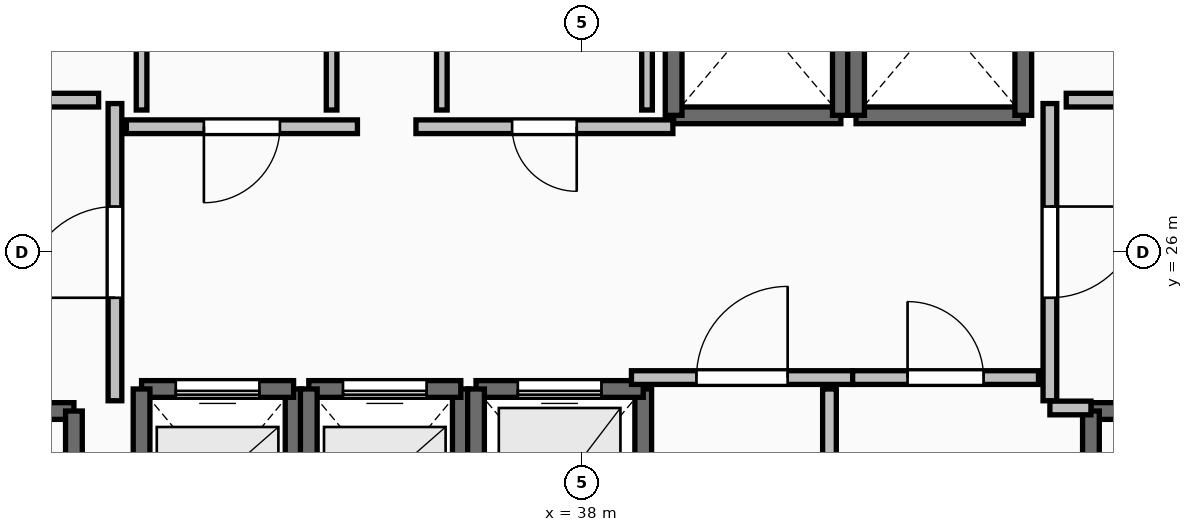
"""IFC4 building model, lengths in metres.
Left out: names, types, materials, properties, quantities, classifications, styles, units other than length and angle.
Written with IfcOpenShell. Run it as: python <this file> out.ifc"""

import sys

from ifc_helpers import new_model, si_unit, direction, frame, frame_2d, origin, place, context, subcontext, project, spatial, rectangle, extrude, element, fill, save


model = new_model("IFC4")
c1 = context("Model", 3, precision=1e-05, world=origin(), true_north=direction((0.0, 1.0)))
c2 = subcontext(c1, "Body", "Model", "MODEL_VIEW")
j1 = project(units=[si_unit("LENGTHUNIT", "METRE"), si_unit("PLANEANGLEUNIT", "RADIAN")], contexts=[c1])
p1 = place(None, origin())
s1 = spatial("IfcSite", under=j1, at=p1, CompositionType="ELEMENT")
p2 = place(p1, origin())
s2 = spatial("IfcBuilding", under=s1, at=p2, CompositionType="ELEMENT")
p3 = place(p2, frame((0.0, 0.0, 214.3)))
s3 = spatial("IfcBuildingStorey", under=s2, at=p3, CompositionType="ELEMENT", Elevation=214.3)
p4 = place(p3, frame((27.94, 23.91, 0.0), z_axis=(0.0, 0.0, 1.0), x_axis=(1.0, 0.0, 0.0)))
e1 = element("IfcWall", 1, at=p4, inside=s3, PredefinedType="SOLIDWALL", context=c2, shape_type="SweptSolid", body=[
    extrude(rectangle(XDim=3.37, YDim=0.22, at=frame_2d((1.685, 0.0))), origin(), (0.0, 0.0, 1.0), 3.29),
])
p5 = place(p4, frame((1.135, 0.0, 0.0)))
e2 = element("IfcOpeningElement", 2, at=p5, cuts=e1, PredefinedType="OPENING", context=c2, shape_type="SweptSolid", body=[
    extrude(rectangle(XDim=1.1, YDim=2.15, at=frame_2d((0.55, 1.075))), frame((0.0, 0.125, 0.0), z_axis=(0.0, -1.0, 0.0), x_axis=(1.0, 0.0, 0.0)), (0.0, 0.0, 1.0), 0.25),
])
p6 = place(p3, frame((31.31, 23.91, 0.0), z_axis=(0.0, 0.0, 1.0), x_axis=(0.0, -1.0, 0.0)))
e3 = element("IfcWall", 3, at=p6, inside=s3, PredefinedType="SOLIDWALL", context=c2, shape_type="SweptSolid", body=[
    extrude(rectangle(XDim=7.42, YDim=0.22, at=frame_2d((3.71, 0.0))), origin(), (0.0, 0.0, 1.0), 3.29),
])
p7 = place(p3, frame((44.69, 23.91, 0.0), z_axis=(0.0, 0.0, 1.0), x_axis=(1.0, 0.0, 0.0)))
e4 = element("IfcWall", 4, at=p7, inside=s3, PredefinedType="SOLIDWALL", context=c2, shape_type="SweptSolid", body=[
    extrude(rectangle(XDim=3.37, YDim=0.22, at=frame_2d((1.685, 0.0))), origin(), (0.0, 0.0, 1.0), 3.29),
])
p8 = place(p7, frame((1.135, 0.0, 0.0)))
e5 = element("IfcOpeningElement", 5, at=p8, cuts=e4, PredefinedType="OPENING", context=c2, shape_type="SweptSolid", body=[
    extrude(rectangle(XDim=1.1, YDim=2.15, at=frame_2d((0.55, 1.075))), frame((0.0, 0.125, 0.0), z_axis=(0.0, -1.0, 0.0), x_axis=(1.0, 0.0, 0.0)), (0.0, 0.0, 1.0), 0.25),
])
p9 = place(p3, frame((44.69, 16.49, 0.0), z_axis=(0.0, 0.0, 1.0), x_axis=(0.0, 1.0, 0.0)))
e6 = element("IfcWall", 6, at=p9, inside=s3, PredefinedType="SOLIDWALL", context=c2, shape_type="SweptSolid", body=[
    extrude(rectangle(XDim=7.42, YDim=0.22, at=frame_2d((3.71, 0.0))), origin(), (0.0, 0.0, 1.0), 3.29),
])
p10 = place(p3, frame((34.2, 21.8, 0.0), z_axis=(0.0, 0.0, 1.0), x_axis=(0.0, 1.0, 0.0)))
e7 = element("IfcWall", 7, at=p10, inside=s3, PredefinedType="SOLIDWALL", context=c2, shape_type="SweptSolid", body=[
    extrude(rectangle(XDim=2.4, YDim=0.22, at=frame_2d((1.2, 0.0))), origin(), (0.0, 0.0, 1.0), 3.29),
])
p11 = place(p3, frame((34.2, 24.2, 0.0), z_axis=(0.0, 0.0, 1.0), x_axis=(-1.0, 0.0, 0.0)))
e8 = element("IfcWall", 8, at=p11, inside=s3, PredefinedType="SOLIDWALL", context=c2, shape_type="SweptSolid", body=[
    extrude(rectangle(XDim=2.0, YDim=0.22, at=frame_2d((1.0, 0.0))), origin(), (0.0, 0.0, 1.0), 3.29),
])
p12 = place(p11, frame((0.45, 0.0, 0.0)))
e9 = element("IfcOpeningElement", 9, at=p12, cuts=e8, PredefinedType="OPENING", context=c2, shape_type="SweptSolid", body=[
    extrude(rectangle(XDim=1.1, YDim=2.2, at=frame_2d((0.55, 1.1))), frame((0.0, 0.125, 0.0), z_axis=(0.0, -1.0, 0.0), x_axis=(1.0, 0.0, 0.0)), (0.0, 0.0, 1.0), 0.25),
])
for number, where, z_axis, x_axis in (
    (10, (32.2, 24.2, 0.0), (0.0, 0.0, 1.0), (0.0, -1.0, 0.0)),
    (11, (36.4, 21.8, 0.0), (0.0, 0.0, 1.0), (0.0, 1.0, 0.0)),
):
    element("IfcWall", number, at=place(p3, frame(where, z_axis=z_axis, x_axis=x_axis)), inside=s3, PredefinedType="SOLIDWALL", context=c2, shape_type="SweptSolid", body=[
        extrude(rectangle(XDim=2.4, YDim=0.22, at=frame_2d((1.2, 0.0))), origin(), (0.0, 0.0, 1.0), 3.29),
    ])
p13 = place(p3, frame((36.4, 24.2, 0.0), z_axis=(0.0, 0.0, 1.0), x_axis=(-1.0, 0.0, 0.0)))
e12 = element("IfcWall", 12, at=p13, inside=s3, PredefinedType="SOLIDWALL", context=c2, shape_type="SweptSolid", body=[
    extrude(rectangle(XDim=2.0, YDim=0.22, at=frame_2d((1.0, 0.0))), origin(), (0.0, 0.0, 1.0), 3.29),
])
p14 = place(p13, frame((0.45, 0.0, 0.0)))
e13 = element("IfcOpeningElement", 13, at=p14, cuts=e12, PredefinedType="OPENING", context=c2, shape_type="SweptSolid", body=[
    extrude(rectangle(XDim=1.1, YDim=2.2, at=frame_2d((0.55, 1.1))), frame((0.0, 0.125, 0.0), z_axis=(0.0, -1.0, 0.0), x_axis=(1.0, 0.0, 0.0)), (0.0, 0.0, 1.0), 0.25),
])
p15 = place(p3, frame((34.4, 24.2, 0.0), z_axis=(0.0, 0.0, 1.0), x_axis=(0.0, -1.0, 0.0)))
e14 = element("IfcWall", 14, at=p15, inside=s3, PredefinedType="SOLIDWALL", context=c2, shape_type="SweptSolid", body=[
    extrude(rectangle(XDim=2.4, YDim=0.22, at=frame_2d((1.2, 0.0))), origin(), (0.0, 0.0, 1.0), 3.29),
])
p16 = place(p3, frame((38.8, 21.6, 0.0), z_axis=(0.0, 0.0, 1.0), x_axis=(0.0, 1.0, 0.0)))
e15 = element("IfcWall", 15, at=p16, inside=s3, PredefinedType="SOLIDWALL", context=c2, shape_type="SweptSolid", body=[
    extrude(rectangle(XDim=2.6, YDim=0.22, at=frame_2d((1.3, 0.0))), origin(), (0.0, 0.0, 1.0), 3.29),
])
p17 = place(p3, frame((38.8, 24.2, 0.0), z_axis=(0.0, 0.0, 1.0), x_axis=(-1.0, 0.0, 0.0)))
e16 = element("IfcWall", 16, at=p17, inside=s3, PredefinedType="SOLIDWALL", context=c2, shape_type="SweptSolid", body=[
    extrude(rectangle(XDim=2.2, YDim=0.22, at=frame_2d((1.1, 0.0))), origin(), (0.0, 0.0, 1.0), 3.29),
])
p18 = place(p17, frame((0.55, 0.0, 0.0)))
e17 = element("IfcOpeningElement", 17, at=p18, cuts=e16, PredefinedType="OPENING", context=c2, shape_type="SweptSolid", body=[
    extrude(rectangle(XDim=1.1, YDim=2.2, at=frame_2d((0.55, 1.1))), frame((0.0, 0.125, 0.0), z_axis=(0.0, -1.0, 0.0), x_axis=(1.0, 0.0, 0.0)), (0.0, 0.0, 1.0), 0.25),
])
p19 = place(p3, frame((36.6, 24.2, 0.0), z_axis=(0.0, 0.0, 1.0), x_axis=(0.0, -1.0, 0.0)))
e18 = element("IfcWall", 18, at=p19, inside=s3, PredefinedType="SOLIDWALL", context=c2, shape_type="SweptSolid", body=[
    extrude(rectangle(XDim=2.6, YDim=0.22, at=frame_2d((1.3, 0.0))), origin(), (0.0, 0.0, 1.0), 3.29),
])
p20 = place(p3, frame((39.2, 27.8, 0.0), z_axis=(0.0, 0.0, 1.0), x_axis=(1.0, 0.0, 0.0)))
e19 = element("IfcWall", 19, at=p20, inside=s3, PredefinedType="SOLIDWALL", context=c2, shape_type="SweptSolid", body=[
    extrude(rectangle(XDim=2.2, YDim=0.22, at=frame_2d((1.1, 0.0))), origin(), (0.0, 0.0, 1.0), 3.29),
])
for number, where, z_axis, x_axis in (
    (20, (41.4, 27.8, 0.0), (0.0, 0.0, 1.0), (0.0, 1.0, 0.0)),
    (21, (39.2, 30.4, 0.0), (0.0, 0.0, 1.0), (0.0, -1.0, 0.0)),
):
    element("IfcWall", number, at=place(p3, frame(where, z_axis=z_axis, x_axis=x_axis)), inside=s3, PredefinedType="SOLIDWALL", context=c2, shape_type="SweptSolid", body=[
        extrude(rectangle(XDim=2.6, YDim=0.22, at=frame_2d((1.3, 0.0))), origin(), (0.0, 0.0, 1.0), 3.29),
    ])
p21 = place(p3, frame((41.6, 27.8, 0.0), z_axis=(0.0, 0.0, 1.0), x_axis=(1.0, 0.0, 0.0)))
e22 = element("IfcWall", 22, at=p21, inside=s3, PredefinedType="SOLIDWALL", context=c2, shape_type="SweptSolid", body=[
    extrude(rectangle(XDim=2.2, YDim=0.22, at=frame_2d((1.1, 0.0))), origin(), (0.0, 0.0, 1.0), 3.29),
])
for number, where, z_axis, x_axis in (
    (23, (43.8, 27.8, 0.0), (0.0, 0.0, 1.0), (0.0, 1.0, 0.0)),
    (24, (41.6, 30.4, 0.0), (0.0, 0.0, 1.0), (0.0, -1.0, 0.0)),
):
    element("IfcWall", number, at=place(p3, frame(where, z_axis=z_axis, x_axis=x_axis)), inside=s3, PredefinedType="SOLIDWALL", context=c2, shape_type="SweptSolid", body=[
        extrude(rectangle(XDim=2.6, YDim=0.22, at=frame_2d((1.3, 0.0))), origin(), (0.0, 0.0, 1.0), 3.29),
    ])
p22 = place(p3, frame((31.85, 24.045, 0.0), z_axis=(0.0, 0.0, 1.0), x_axis=(0.0, 1.0, 0.0)))
e25 = element("IfcWall", 25, at=p22, inside=s3, PredefinedType="PARTITIONING", context=c2, shape_type="SweptSolid", body=[
    extrude(rectangle(XDim=3.91, YDim=0.18, at=frame_2d((1.955, 0.0))), origin(), (0.0, 0.0, 1.0), 3.29),
])
p23 = place(p22, frame((1.355, 0.0, 0.0)))
e26 = element("IfcOpeningElement", 26, at=p23, cuts=e25, PredefinedType="OPENING", context=c2, shape_type="SweptSolid", body=[
    extrude(rectangle(XDim=1.2, YDim=2.15, at=frame_2d((0.6, 1.075))), frame((0.0, 0.105, 0.0), z_axis=(0.0, -1.0, 0.0), x_axis=(1.0, 0.0, 0.0)), (0.0, 0.0, 1.0), 0.21),
])
p24 = place(p3, frame((44.15, 27.955, 0.0), z_axis=(0.0, 0.0, 1.0), x_axis=(0.0, -1.0, 0.0)))
e27 = element("IfcWall", 27, at=p24, inside=s3, PredefinedType="PARTITIONING", context=c2, shape_type="SweptSolid", body=[
    extrude(rectangle(XDim=3.91, YDim=0.18, at=frame_2d((1.955, 0.0))), origin(), (0.0, 0.0, 1.0), 3.29),
])
p25 = place(p24, frame((1.355, 0.0, 0.0)))
e28 = element("IfcOpeningElement", 28, at=p25, cuts=e27, PredefinedType="OPENING", context=c2, shape_type="SweptSolid", body=[
    extrude(rectangle(XDim=1.2, YDim=2.15, at=frame_2d((0.6, 1.075))), frame((0.0, 0.105, 0.0), z_axis=(0.0, -1.0, 0.0), x_axis=(1.0, 0.0, 0.0)), (0.0, 0.0, 1.0), 0.21),
])
p26 = place(p3, frame((44.15, 23.95, 0.0), z_axis=(0.0, 0.0, 1.0), x_axis=(1.0, 0.0, 0.0)))
e29 = element("IfcWall", 29, at=p26, inside=s3, PredefinedType="PARTITIONING", context=c2, shape_type="SweptSolid", body=[
    extrude(rectangle(XDim=0.54, YDim=0.18, at=frame_2d((0.27, 0.0))), origin(), (0.0, 0.0, 1.0), 3.29),
])
p27 = place(p3, frame((38.645, 24.35, 0.0), z_axis=(0.0, 0.0, 1.0), x_axis=(1.0, 0.0, 0.0)))
e30 = element("IfcWall", 30, at=p27, inside=s3, PredefinedType="PARTITIONING", context=c2, shape_type="SweptSolid", body=[
    extrude(rectangle(XDim=2.91, YDim=0.18, at=frame_2d((1.455, 0.0))), origin(), (0.0, 0.0, 1.0), 3.29),
])
p28 = place(p27, frame((0.855, 0.0, 0.0)))
e31 = element("IfcOpeningElement", 31, at=p28, cuts=e30, PredefinedType="OPENING", context=c2, shape_type="SweptSolid", body=[
    extrude(rectangle(XDim=1.2, YDim=2.15, at=frame_2d((0.6, 1.075))), frame((0.0, 0.105, 0.0), z_axis=(0.0, -1.0, 0.0), x_axis=(1.0, 0.0, 0.0)), (0.0, 0.0, 1.0), 0.21),
])
p29 = place(p3, frame((41.555, 24.35, 0.0), z_axis=(0.0, 0.0, 1.0), x_axis=(1.0, 0.0, 0.0)))
e32 = element("IfcWall", 32, at=p29, inside=s3, PredefinedType="PARTITIONING", context=c2, shape_type="SweptSolid", body=[
    extrude(rectangle(XDim=2.445, YDim=0.18, at=frame_2d((1.223, 0.0))), origin(), (0.0, 0.0, 1.0), 3.29),
])
p30 = place(p29, frame((0.722, 0.0, 0.0)))
e33 = element("IfcOpeningElement", 33, at=p30, cuts=e32, PredefinedType="OPENING", context=c2, shape_type="SweptSolid", body=[
    extrude(rectangle(XDim=1.0, YDim=2.15, at=frame_2d((0.5, 1.075))), frame((0.0, 0.105, 0.0), z_axis=(0.0, -1.0, 0.0), x_axis=(1.0, 0.0, 0.0)), (0.0, 0.0, 1.0), 0.21),
])
p31 = place(p3, frame((35.04, 27.65, 0.0), z_axis=(0.0, 0.0, 1.0), x_axis=(-1.0, 0.0, 0.0)))
e34 = element("IfcWall", 34, at=p31, inside=s3, PredefinedType="PARTITIONING", context=c2, shape_type="SweptSolid", body=[
    extrude(rectangle(XDim=3.04, YDim=0.18, at=frame_2d((1.52, 0.0))), origin(), (0.0, 0.0, 1.0), 3.29),
])
p32 = place(p31, frame((1.02, 0.0, 0.0)))
e35 = element("IfcOpeningElement", 35, at=p32, cuts=e34, PredefinedType="OPENING", context=c2, shape_type="SweptSolid", body=[
    extrude(rectangle(XDim=1.0, YDim=2.15, at=frame_2d((0.5, 1.075))), frame((0.0, 0.105, 0.0), z_axis=(0.0, -1.0, 0.0), x_axis=(1.0, 0.0, 0.0)), (0.0, 0.0, 1.0), 0.21),
])
p33 = place(p3, frame((39.19, 27.65, 0.0), z_axis=(0.0, 0.0, 1.0), x_axis=(-1.0, 0.0, 0.0)))
e36 = element("IfcWall", 36, at=p33, inside=s3, PredefinedType="PARTITIONING", context=c2, shape_type="SweptSolid", body=[
    extrude(rectangle(XDim=3.38, YDim=0.18, at=frame_2d((1.69, 0.0))), origin(), (0.0, 0.0, 1.0), 3.29),
])
p34 = place(p33, frame((1.265, 0.0, 0.0)))
e37 = element("IfcOpeningElement", 37, at=p34, cuts=e36, PredefinedType="OPENING", context=c2, shape_type="SweptSolid", body=[
    extrude(rectangle(XDim=0.85, YDim=2.1, at=frame_2d((0.425, 1.05))), frame((0.0, 0.105, 0.0), z_axis=(0.0, -1.0, 0.0), x_axis=(1.0, 0.0, 0.0)), (0.0, 0.0, 1.0), 0.21),
])
p35 = place(p3, frame((41.25, 20.305, 0.0), z_axis=(0.0, 0.0, 1.0), x_axis=(0.0, 1.0, 0.0)))
e38 = element("IfcWall", 38, at=p35, inside=s3, PredefinedType="PARTITIONING", context=c2, shape_type="SweptSolid", body=[
    extrude(rectangle(XDim=3.895, YDim=0.18, at=frame_2d((1.948, 0.0))), origin(), (0.0, 0.0, 1.0), 3.29),
])
p36 = place(p35, frame((1.448, 0.0, 0.0)))
e39 = element("IfcOpeningElement", 39, at=p36, cuts=e38, PredefinedType="OPENING", context=c2, shape_type="SweptSolid", body=[
    extrude(rectangle(XDim=1.0, YDim=2.15, at=frame_2d((0.5, 1.075))), frame((0.0, 0.105, 0.0), z_axis=(0.0, -1.0, 0.0), x_axis=(1.0, 0.0, 0.0)), (0.0, 0.0, 1.0), 0.21),
])
for number, where, z_axis, x_axis in (
    (40, (31.635, 28.0, 0.0), (0.0, 0.0, 1.0), (-1.0, 0.0, 0.0)),
    (41, (45.28, 28.0, 0.0), (0.0, 0.0, 1.0), (-1.0, 0.0, 0.0)),
):
    element("IfcWall", number, at=place(p3, frame(where, z_axis=z_axis, x_axis=x_axis)), inside=s3, PredefinedType="PARTITIONING", context=c2, shape_type="SweptSolid", body=[
        extrude(rectangle(XDim=0.915, YDim=0.18, at=frame_2d((0.458, 0.0))), origin(), (0.0, 0.0, 1.0), 3.29),
    ])
for number, where, z_axis, x_axis in (
    (42, (32.2, 30.26, 0.0), (0.0, 0.0, 1.0), (0.0, -1.0, 0.0)),
    (43, (34.7, 27.87, 0.0), (0.0, 0.0, 1.0), (0.0, 1.0, 0.0)),
    (44, (36.15, 30.26, 0.0), (0.0, 0.0, 1.0), (0.0, -1.0, 0.0)),
    (45, (38.85, 27.87, 0.0), (0.0, 0.0, 1.0), (0.0, 1.0, 0.0)),
):
    element("IfcWall", number, at=place(p3, frame(where, z_axis=z_axis, x_axis=x_axis)), inside=s3, PredefinedType="PARTITIONING", context=c2, shape_type="SweptSolid", body=[
        extrude(rectangle(XDim=2.39, YDim=0.14, at=frame_2d((1.195, 0.0))), origin(), (0.0, 0.0, 1.0), 3.29),
    ])
p37 = place(p12, origin())
e46 = element("IfcDoor", 46, at=p37, inside=s3, OperationType="SLIDING_TO_LEFT", PredefinedType="DOOR", context=c2, shape_type="SweptSolid", body=[
    extrude(rectangle(XDim=1.1, YDim=2.2, at=frame_2d((0.55, 1.1))), frame((0.0, 0.025, 0.0), z_axis=(0.0, -1.0, 0.0), x_axis=(1.0, 0.0, 0.0)), (0.0, 0.0, 1.0), 0.05),
])
fill(e9, e46)
p38 = place(p14, origin())
e47 = element("IfcDoor", 47, at=p38, inside=s3, OperationType="SLIDING_TO_LEFT", PredefinedType="DOOR", context=c2, shape_type="SweptSolid", body=[
    extrude(rectangle(XDim=1.1, YDim=2.2, at=frame_2d((0.55, 1.1))), frame((0.0, 0.025, 0.0), z_axis=(0.0, -1.0, 0.0), x_axis=(1.0, 0.0, 0.0)), (0.0, 0.0, 1.0), 0.05),
])
fill(e13, e47)
p39 = place(p18, origin())
e48 = element("IfcDoor", 48, at=p39, inside=s3, OperationType="SLIDING_TO_LEFT", PredefinedType="DOOR", context=c2, shape_type="SweptSolid", body=[
    extrude(rectangle(XDim=1.1, YDim=2.2, at=frame_2d((0.55, 1.1))), frame((0.0, 0.025, 0.0), z_axis=(0.0, -1.0, 0.0), x_axis=(1.0, 0.0, 0.0)), (0.0, 0.0, 1.0), 0.05),
])
fill(e17, e48)
p40 = place(p23, origin())
e49 = element("IfcDoor", 49, at=p40, inside=s3, OperationType="SINGLE_SWING_LEFT", PredefinedType="DOOR", context=c2, shape_type="SweptSolid", body=[
    extrude(rectangle(XDim=1.2, YDim=2.15, at=frame_2d((0.6, 1.075))), frame((0.0, 0.025, 0.0), z_axis=(0.0, -1.0, 0.0), x_axis=(1.0, 0.0, 0.0)), (0.0, 0.0, 1.0), 0.05),
])
fill(e26, e49)
p41 = place(p25, origin())
e50 = element("IfcDoor", 50, at=p41, inside=s3, OperationType="SINGLE_SWING_LEFT", PredefinedType="DOOR", context=c2, shape_type="SweptSolid", body=[
    extrude(rectangle(XDim=1.2, YDim=2.15, at=frame_2d((0.6, 1.075))), frame((0.0, 0.025, 0.0), z_axis=(0.0, -1.0, 0.0), x_axis=(1.0, 0.0, 0.0)), (0.0, 0.0, 1.0), 0.05),
])
fill(e28, e50)
p42 = place(p28, origin())
e51 = element("IfcDoor", 51, at=p42, inside=s3, OperationType="SINGLE_SWING_RIGHT", PredefinedType="DOOR", context=c2, shape_type="SweptSolid", body=[
    extrude(rectangle(XDim=1.2, YDim=2.15, at=frame_2d((0.6, 1.075))), frame((0.0, 0.025, 0.0), z_axis=(0.0, -1.0, 0.0), x_axis=(1.0, 0.0, 0.0)), (0.0, 0.0, 1.0), 0.05),
])
fill(e31, e51)
p43 = place(p30, origin())
e52 = element("IfcDoor", 52, at=p43, inside=s3, OperationType="SINGLE_SWING_LEFT", PredefinedType="DOOR", context=c2, shape_type="SweptSolid", body=[
    extrude(rectangle(XDim=1.0, YDim=2.15, at=frame_2d((0.5, 1.075))), frame((0.0, 0.025, 0.0), z_axis=(0.0, -1.0, 0.0), x_axis=(1.0, 0.0, 0.0)), (0.0, 0.0, 1.0), 0.05),
])
fill(e33, e52)
p44 = place(p32, origin())
e53 = element("IfcDoor", 53, at=p44, inside=s3, OperationType="SINGLE_SWING_RIGHT", PredefinedType="DOOR", context=c2, shape_type="SweptSolid", body=[
    extrude(rectangle(XDim=1.0, YDim=2.15, at=frame_2d((0.5, 1.075))), frame((0.0, 0.025, 0.0), z_axis=(0.0, -1.0, 0.0), x_axis=(1.0, 0.0, 0.0)), (0.0, 0.0, 1.0), 0.05),
])
fill(e35, e53)
p45 = place(p34, origin())
e54 = element("IfcDoor", 54, at=p45, inside=s3, OperationType="SINGLE_SWING_LEFT", PredefinedType="DOOR", context=c2, shape_type="SweptSolid", body=[
    extrude(rectangle(XDim=0.85, YDim=2.1, at=frame_2d((0.425, 1.05))), frame((0.0, 0.025, 0.0), z_axis=(0.0, -1.0, 0.0), x_axis=(1.0, 0.0, 0.0)), (0.0, 0.0, 1.0), 0.05),
])
fill(e37, e54)
save(model, sys.argv[1])
